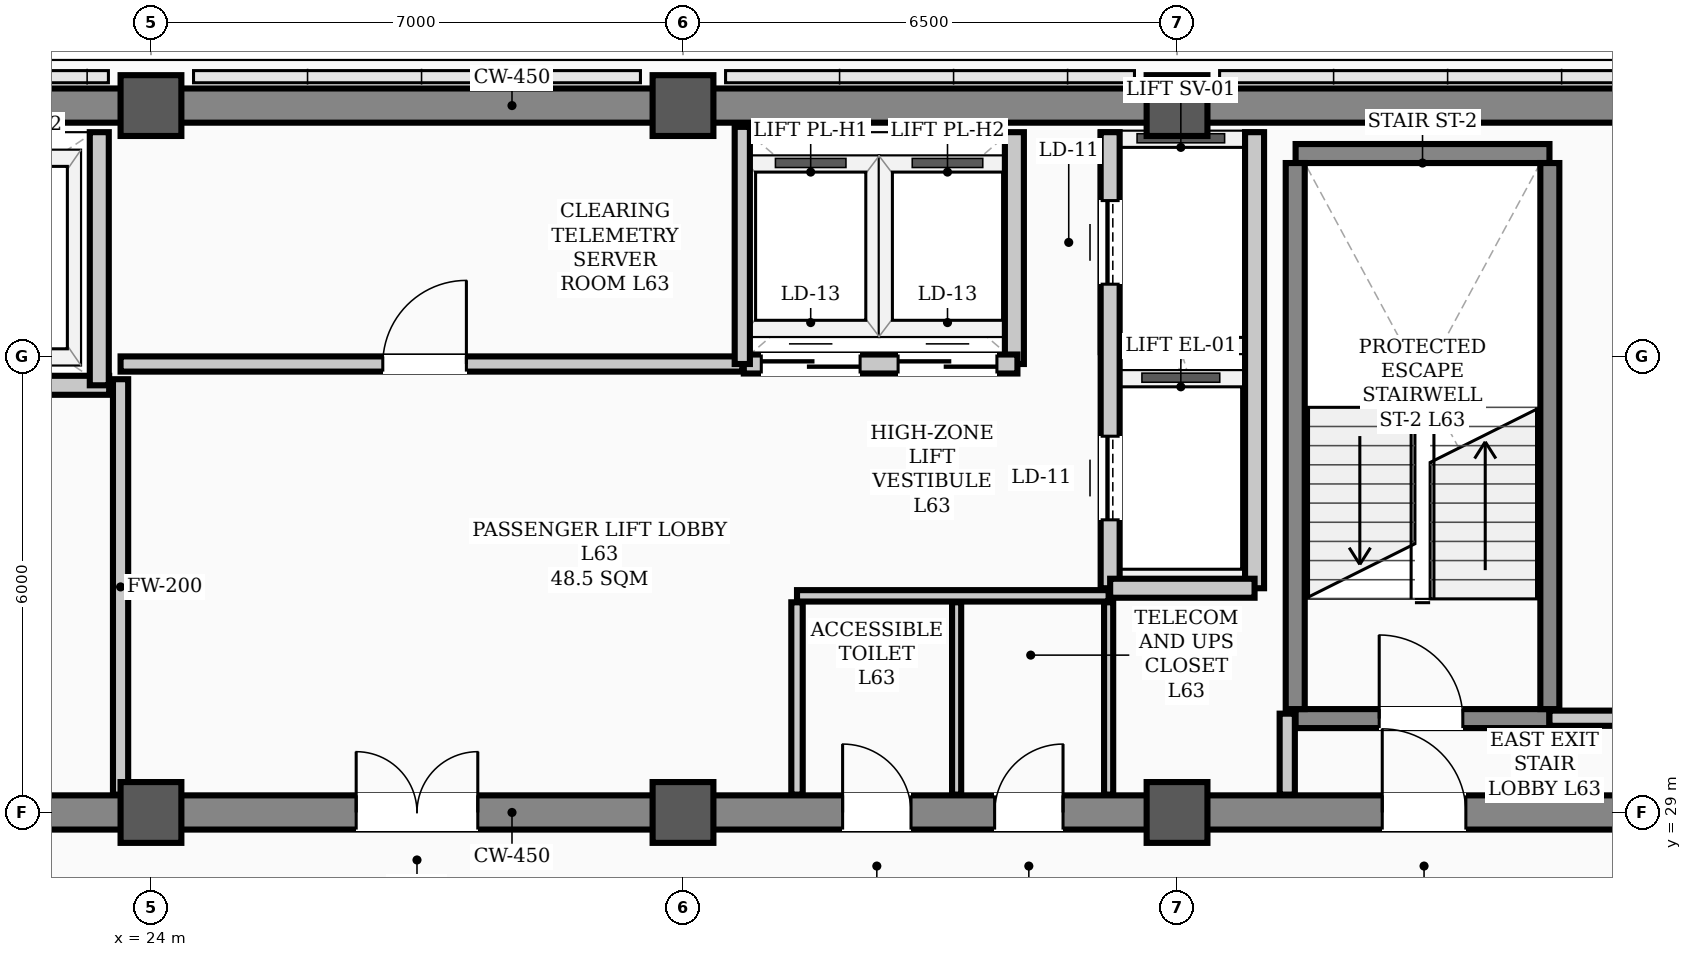
"""IFC4 building model, lengths in metres.
Left out: names, types, materials, properties, quantities, classifications, styles, units other than length and angle.
Written with IfcOpenShell. Run it as: python <this file> out.ifc"""

import sys

from ifc_helpers import new_model, si_unit, direction, frame, frame_2d, origin, origin_2d, place, context, subcontext, project, spatial, rectangle, hollow_rectangle, extrude, element, fill, save


model = new_model("IFC4")
c1 = context("Model", 3, precision=1e-05, world=origin(), true_north=direction((0.0, 1.0)))
c2 = subcontext(c1, "Body", "Model", "MODEL_VIEW")
j1 = project(units=[si_unit("LENGTHUNIT", "METRE"), si_unit("PLANEANGLEUNIT", "RADIAN")], contexts=[c1])
p1 = place(None, origin())
s1 = spatial("IfcSite", under=j1, at=p1, CompositionType="ELEMENT")
p2 = place(p1, origin())
s2 = spatial("IfcBuilding", under=s1, at=p2, CompositionType="ELEMENT")
p3 = place(p2, frame((0.0, 0.0, 254.0)))
s3 = spatial("IfcBuildingStorey", under=s2, at=p3, CompositionType="ELEMENT", Elevation=254.0)
for number, where, z_axis, x_axis in (
    (1, (24.0, 29.0, 0.0), (0.0, 0.0, 1.0), (1.0, 0.0, 0.0)),
    (2, (24.0, 38.3, 0.0), (0.0, 0.0, 1.0), (1.0, 0.0, 0.0)),
    (3, (31.0, 29.0, 0.0), (0.0, 0.0, 1.0), (1.0, 0.0, 0.0)),
    (4, (31.0, 38.3, 0.0), (0.0, 0.0, 1.0), (1.0, 0.0, 0.0)),
    (5, (37.5, 29.0, 0.0), (0.0, 0.0, 1.0), (1.0, 0.0, 0.0)),
    (6, (37.5, 38.3, 0.0), (0.0, 0.0, 1.0), (1.0, 0.0, 0.0)),
):
    element("IfcColumn", number, at=place(p3, frame(where, z_axis=z_axis, x_axis=x_axis)), inside=s3, PredefinedType="COLUMN", context=c2, shape_type="SweptSolid", body=[
        extrude(hollow_rectangle(XDim=0.8, YDim=0.8, WallThickness=0.032, InnerFilletRadius=0.016, OuterFilletRadius=0.048, at=origin_2d()), origin(), (0.0, 0.0, 1.0), 3.9),
    ])
p4 = place(p3, frame((13.5, 29.0, 0.0), z_axis=(0.0, 0.0, 1.0), x_axis=(1.0, 0.0, 0.0)))
e7 = element("IfcWall", 7, at=p4, inside=s3, PredefinedType="SHEAR", context=c2, shape_type="SweptSolid", body=[
    extrude(rectangle(XDim=30.5, YDim=0.45, at=frame_2d((15.25, 0.0))), origin(), (0.0, 0.0, 1.0), 3.66),
])
p5 = place(p4, frame((1.75, 0.0, 0.0)))
e8 = element("IfcOpeningElement", 8, at=p5, cuts=e7, PredefinedType="OPENING", context=c2, shape_type="SweptSolid", body=[
    extrude(rectangle(XDim=1.1, YDim=2.08, at=frame_2d((0.55, 1.04))), frame((0.0, 0.235, 0.0), z_axis=(0.0, -1.0, 0.0), x_axis=(1.0, 0.0, 0.0)), (0.0, 0.0, 1.0), 0.47),
])
p6 = place(p4, frame((26.7, 0.0, 0.0)))
e9 = element("IfcOpeningElement", 9, at=p6, cuts=e7, PredefinedType="OPENING", context=c2, shape_type="SweptSolid", body=[
    extrude(rectangle(XDim=1.1, YDim=2.08, at=frame_2d((0.55, 1.04))), frame((0.0, 0.235, 0.0), z_axis=(0.0, -1.0, 0.0), x_axis=(1.0, 0.0, 0.0)), (0.0, 0.0, 1.0), 0.47),
])
p7 = place(p4, frame((6.8, 0.0, 0.0)))
e10 = element("IfcOpeningElement", 10, at=p7, cuts=e7, PredefinedType="OPENING", context=c2, shape_type="SweptSolid", body=[
    extrude(rectangle(XDim=1.1, YDim=2.08, at=frame_2d((0.55, 1.04))), frame((0.0, 0.235, 0.0), z_axis=(0.0, -1.0, 0.0), x_axis=(1.0, 0.0, 0.0)), (0.0, 0.0, 1.0), 0.47),
])
p8 = place(p4, frame((13.2, 0.0, 0.0)))
e11 = element("IfcOpeningElement", 11, at=p8, cuts=e7, PredefinedType="OPENING", context=c2, shape_type="SweptSolid", body=[
    extrude(rectangle(XDim=1.6, YDim=2.08, at=frame_2d((0.8, 1.04))), frame((0.0, 0.235, 0.0), z_axis=(0.0, -1.0, 0.0), x_axis=(1.0, 0.0, 0.0)), (0.0, 0.0, 1.0), 0.47),
])
p9 = place(p4, frame((19.6, 0.0, 0.0)))
e12 = element("IfcOpeningElement", 12, at=p9, cuts=e7, PredefinedType="OPENING", context=c2, shape_type="SweptSolid", body=[
    extrude(rectangle(XDim=0.9, YDim=2.08, at=frame_2d((0.45, 1.04))), frame((0.0, 0.235, 0.0), z_axis=(0.0, -1.0, 0.0), x_axis=(1.0, 0.0, 0.0)), (0.0, 0.0, 1.0), 0.47),
])
p10 = place(p4, frame((21.6, 0.0, 0.0)))
e13 = element("IfcOpeningElement", 13, at=p10, cuts=e7, PredefinedType="OPENING", context=c2, shape_type="SweptSolid", body=[
    extrude(rectangle(XDim=0.9, YDim=2.08, at=frame_2d((0.45, 1.04))), frame((0.0, 0.235, 0.0), z_axis=(0.0, -1.0, 0.0), x_axis=(1.0, 0.0, 0.0)), (0.0, 0.0, 1.0), 0.47),
])
p11 = place(p3, frame((13.5, 38.3, 0.0), z_axis=(0.0, 0.0, 1.0), x_axis=(1.0, 0.0, 0.0)))
e14 = element("IfcWall", 14, at=p11, inside=s3, PredefinedType="SHEAR", context=c2, shape_type="SweptSolid", body=[
    extrude(rectangle(XDim=30.5, YDim=0.45, at=frame_2d((15.25, 0.0))), origin(), (0.0, 0.0, 1.0), 3.66),
])
p12 = place(p3, frame((39.06, 30.235, 0.0), z_axis=(0.0, 0.0, 1.0), x_axis=(1.0, 0.0, 0.0)))
e15 = element("IfcWall", 15, at=p12, inside=s3, PredefinedType="STANDARD", context=c2, shape_type="SweptSolid", body=[
    extrude(rectangle(XDim=3.34, YDim=0.25, at=frame_2d((1.67, 0.0))), origin(), (0.0, 0.0, 1.0), 3.66),
])
p13 = place(p12, frame((1.1, 0.0, 0.0)))
e16 = element("IfcOpeningElement", 16, at=p13, cuts=e15, PredefinedType="OPENING", context=c2, shape_type="SweptSolid", body=[
    extrude(rectangle(XDim=1.1, YDim=2.08, at=frame_2d((0.55, 1.04))), frame((0.0, 0.135, 0.0), z_axis=(0.0, -1.0, 0.0), x_axis=(1.0, 0.0, 0.0)), (0.0, 0.0, 1.0), 0.27),
])
p14 = place(p3, frame((39.06, 37.669, 0.0), z_axis=(0.0, 0.0, 1.0), x_axis=(1.0, 0.0, 0.0)))
e17 = element("IfcWall", 17, at=p14, inside=s3, PredefinedType="STANDARD", context=c2, shape_type="SweptSolid", body=[
    extrude(rectangle(XDim=3.34, YDim=0.25, at=frame_2d((1.67, 0.0))), origin(), (0.0, 0.0, 1.0), 3.66),
])
for number, where, z_axis, x_axis in (
    (18, (39.055, 30.36, 0.0), (0.0, 0.0, 1.0), (0.0, 1.0, 0.0)),
    (19, (42.405, 30.36, 0.0), (0.0, 0.0, 1.0), (0.0, 1.0, 0.0)),
):
    element("IfcWall", number, at=place(p3, frame(where, z_axis=z_axis, x_axis=x_axis)), inside=s3, PredefinedType="STANDARD", context=c2, shape_type="SweptSolid", body=[
        extrude(rectangle(XDim=7.184, YDim=0.25, at=frame_2d((3.592, 0.0))), origin(), (0.0, 0.0, 1.0), 3.66),
    ])
p15 = place(p3, frame((18.1, 34.62, 0.0), z_axis=(0.0, 0.0, 1.0), x_axis=(1.0, 0.0, 0.0)))
e20 = element("IfcWall", 20, at=p15, inside=s3, PredefinedType="STANDARD", context=c2, shape_type="SweptSolid", body=[
    extrude(rectangle(XDim=5.35, YDim=0.25, at=frame_2d((2.675, 0.0))), origin(), (0.0, 0.0, 1.0), 3.66),
])
p16 = place(p15, frame((0.85, 0.0, 0.0)))
e21 = element("IfcOpeningElement", 21, at=p16, cuts=e20, PredefinedType="OPENING", context=c2, shape_type="SweptSolid", body=[
    extrude(rectangle(XDim=1.1, YDim=2.08, at=frame_2d((0.55, 1.04))), frame((0.0, 0.135, 0.0), z_axis=(0.0, -1.0, 0.0), x_axis=(1.0, 0.0, 0.0)), (0.0, 0.0, 1.0), 0.27),
])
p17 = place(p15, frame((3.45, 0.0, 0.0)))
e22 = element("IfcOpeningElement", 22, at=p17, cuts=e20, PredefinedType="OPENING", context=c2, shape_type="SweptSolid", body=[
    extrude(rectangle(XDim=1.1, YDim=2.08, at=frame_2d((0.55, 1.04))), frame((0.0, 0.135, 0.0), z_axis=(0.0, -1.0, 0.0), x_axis=(1.0, 0.0, 0.0)), (0.0, 0.0, 1.0), 0.27),
])
p18 = place(p3, frame((36.62, 31.95, 0.0), z_axis=(0.0, 0.0, 1.0), x_axis=(0.0, 1.0, 0.0)))
e23 = element("IfcWall", 23, at=p18, inside=s3, PredefinedType="STANDARD", context=c2, shape_type="SweptSolid", body=[
    extrude(rectangle(XDim=6.0, YDim=0.25, at=frame_2d((3.0, 0.0))), origin(), (0.0, 0.0, 1.0), 2.24),
])
p19 = place(p18, frame((0.9, 0.0, 0.0)))
e24 = element("IfcOpeningElement", 24, at=p19, cuts=e23, PredefinedType="OPENING", context=c2, shape_type="SweptSolid", body=[
    extrude(rectangle(XDim=1.1, YDim=2.08, at=frame_2d((0.55, 1.04))), frame((0.0, 0.135, 0.0), z_axis=(0.0, -1.0, 0.0), x_axis=(1.0, 0.0, 0.0)), (0.0, 0.0, 1.0), 0.27),
])
p20 = place(p18, frame((4.0, 0.0, 0.0)))
e25 = element("IfcOpeningElement", 25, at=p20, cuts=e23, PredefinedType="OPENING", context=c2, shape_type="SweptSolid", body=[
    extrude(rectangle(XDim=1.1, YDim=2.08, at=frame_2d((0.55, 1.04))), frame((0.0, 0.135, 0.0), z_axis=(0.0, -1.0, 0.0), x_axis=(1.0, 0.0, 0.0)), (0.0, 0.0, 1.0), 0.27),
])
p21 = place(p3, frame((38.52, 31.95, 0.0), z_axis=(0.0, 0.0, 1.0), x_axis=(0.0, 1.0, 0.0)))
e26 = element("IfcWall", 26, at=p21, inside=s3, PredefinedType="STANDARD", context=c2, shape_type="SweptSolid", body=[
    extrude(rectangle(XDim=6.0, YDim=0.25, at=frame_2d((3.0, 0.0))), origin(), (0.0, 0.0, 1.0), 3.48),
])
p22 = place(p3, frame((36.62, 31.95, 0.0), z_axis=(0.0, 0.0, 1.0), x_axis=(1.0, 0.0, 0.0)))
e27 = element("IfcWall", 27, at=p22, inside=s3, PredefinedType="STANDARD", context=c2, shape_type="SweptSolid", body=[
    extrude(rectangle(XDim=1.9, YDim=0.25, at=frame_2d((0.95, 0.0))), origin(), (0.0, 0.0, 1.0), 3.48),
])
p23 = place(p3, frame((23.32, 34.62, 0.0), z_axis=(0.0, 0.0, 1.0), x_axis=(0.0, 1.0, 0.0)))
e28 = element("IfcWall", 28, at=p23, inside=s3, PredefinedType="STANDARD", context=c2, shape_type="SweptSolid", body=[
    extrude(rectangle(XDim=3.33, YDim=0.25, at=frame_2d((1.665, 0.0))), origin(), (0.0, 0.0, 1.0), 2.24),
])
p24 = place(p3, frame((35.36, 34.9, 0.0), z_axis=(0.0, 0.0, 1.0), x_axis=(0.0, 1.0, 0.0)))
e29 = element("IfcWall", 29, at=p24, inside=s3, PredefinedType="STANDARD", context=c2, shape_type="SweptSolid", body=[
    extrude(rectangle(XDim=3.05, YDim=0.25, at=frame_2d((1.525, 0.0))), origin(), (0.0, 0.0, 1.0), 2.24),
])
p25 = place(p3, frame((31.8, 34.9, 0.0), z_axis=(0.0, 0.0, 1.0), x_axis=(1.0, 0.0, 0.0)))
e30 = element("IfcWall", 30, at=p25, inside=s3, PredefinedType="STANDARD", context=c2, shape_type="SweptSolid", body=[
    extrude(rectangle(XDim=3.6, YDim=0.25, at=frame_2d((1.8, 0.0))), origin(), (0.0, 0.0, 1.0), 3.66),
])
p26 = place(p25, frame((0.23, 0.0, 0.0)))
e31 = element("IfcOpeningElement", 31, at=p26, cuts=e30, PredefinedType="OPENING", context=c2, shape_type="SweptSolid", body=[
    extrude(rectangle(XDim=1.3, YDim=2.08, at=frame_2d((0.65, 1.04))), frame((0.0, 0.135, 0.0), z_axis=(0.0, -1.0, 0.0), x_axis=(1.0, 0.0, 0.0)), (0.0, 0.0, 1.0), 0.27),
])
p27 = place(p25, frame((2.03, 0.0, 0.0)))
e32 = element("IfcOpeningElement", 32, at=p27, cuts=e30, PredefinedType="OPENING", context=c2, shape_type="SweptSolid", body=[
    extrude(rectangle(XDim=1.3, YDim=2.08, at=frame_2d((0.65, 1.04))), frame((0.0, 0.135, 0.0), z_axis=(0.0, -1.0, 0.0), x_axis=(1.0, 0.0, 0.0)), (0.0, 0.0, 1.0), 0.27),
])
p28 = place(p3, frame((42.4, 30.24, 0.0), z_axis=(0.0, 0.0, 1.0), x_axis=(1.0, 0.0, 0.0)))
e33 = element("IfcWall", 33, at=p28, inside=s3, PredefinedType="STANDARD", context=c2, shape_type="SweptSolid", body=[
    extrude(rectangle(XDim=1.365, YDim=0.2, at=frame_2d((0.683, 0.0))), origin(), (0.0, 0.0, 1.0), 3.66),
])
p29 = place(p3, frame((23.6, 34.9, 0.0), z_axis=(0.0, 0.0, 1.0), x_axis=(1.0, 0.0, 0.0)))
e34 = element("IfcWall", 34, at=p29, inside=s3, PredefinedType="STANDARD", context=c2, shape_type="SweptSolid", body=[
    extrude(rectangle(XDim=8.18, YDim=0.2, at=frame_2d((4.09, 0.0))), origin(), (0.0, 0.0, 1.0), 3.66),
])
p30 = place(p29, frame((3.45, 0.0, 0.0)))
e35 = element("IfcOpeningElement", 35, at=p30, cuts=e34, PredefinedType="OPENING", context=c2, shape_type="SweptSolid", body=[
    extrude(rectangle(XDim=1.1, YDim=2.08, at=frame_2d((0.55, 1.04))), frame((0.0, 0.11, 0.0), z_axis=(0.0, -1.0, 0.0), x_axis=(1.0, 0.0, 0.0)), (0.0, 0.0, 1.0), 0.22),
])
p31 = place(p3, frame((32.5, 31.85, 0.0), z_axis=(0.0, 0.0, 1.0), x_axis=(1.0, 0.0, 0.0)))
e36 = element("IfcWall", 36, at=p31, inside=s3, PredefinedType="PARTITIONING", context=c2, shape_type="SweptSolid", body=[
    extrude(rectangle(XDim=4.1, YDim=0.15, at=frame_2d((2.05, 0.0))), origin(), (0.0, 0.0, 1.0), 3.66),
])
p32 = place(p3, frame((38.95, 29.235, 0.0), z_axis=(0.0, 0.0, 1.0), x_axis=(0.0, 1.0, 0.0)))
e37 = element("IfcWall", 37, at=p32, inside=s3, PredefinedType="STANDARD", context=c2, shape_type="SweptSolid", body=[
    extrude(rectangle(XDim=1.065, YDim=0.2, at=frame_2d((0.532, 0.0))), origin(), (0.0, 0.0, 1.0), 3.66),
])
p33 = place(p3, frame((23.6, 29.235, 0.0), z_axis=(0.0, 0.0, 1.0), x_axis=(0.0, 1.0, 0.0)))
e38 = element("IfcWall", 38, at=p33, inside=s3, PredefinedType="STANDARD", context=c2, shape_type="SweptSolid", body=[
    extrude(rectangle(XDim=5.465, YDim=0.2, at=frame_2d((2.732, 0.0))), origin(), (0.0, 0.0, 1.0), 2.24),
])
p34 = place(p3, frame((32.5, 29.235, 0.0), z_axis=(0.0, 0.0, 1.0), x_axis=(0.0, 1.0, 0.0)))
e39 = element("IfcWall", 39, at=p34, inside=s3, PredefinedType="PARTITIONING", context=c2, shape_type="SweptSolid", body=[
    extrude(rectangle(XDim=2.53, YDim=0.15, at=frame_2d((1.265, 0.0))), origin(), (0.0, 0.0, 1.0), 2.24),
])
for number, where, z_axis, x_axis in (
    (40, (36.6, 29.235, 0.0), (0.0, 0.0, 1.0), (0.0, 1.0, 0.0)),
    (41, (34.6, 29.235, 0.0), (0.0, 0.0, 1.0), (0.0, 1.0, 0.0)),
):
    element("IfcWall", number, at=place(p3, frame(where, z_axis=z_axis, x_axis=x_axis)), inside=s3, PredefinedType="PARTITIONING", context=c2, shape_type="SweptSolid", body=[
        extrude(rectangle(XDim=2.53, YDim=0.12, at=frame_2d((1.265, 0.0))), origin(), (0.0, 0.0, 1.0), 2.24),
    ])
p35 = place(p3, frame((31.78, 34.9, 0.0), z_axis=(0.0, 0.0, 1.0), x_axis=(0.0, 1.0, 0.0)))
e42 = element("IfcWall", 42, at=p35, inside=s3, PredefinedType="STANDARD", context=c2, shape_type="SweptSolid", body=[
    extrude(rectangle(XDim=3.12, YDim=0.2, at=frame_2d((1.56, 0.0))), origin(), (0.0, 0.0, 1.0), 2.24),
])
p36 = place(p13, origin())
e43 = element("IfcDoor", 43, at=p36, inside=s3, OperationType="SINGLE_SWING_LEFT", PredefinedType="DOOR", context=c2, shape_type="SweptSolid", body=[
    extrude(rectangle(XDim=1.1, YDim=2.08, at=frame_2d((0.55, 1.04))), frame((0.0, 0.025, 0.0), z_axis=(0.0, -1.0, 0.0), x_axis=(1.0, 0.0, 0.0)), (0.0, 0.0, 1.0), 0.05),
])
fill(e16, e43)
p37 = place(p6, origin())
e44 = element("IfcDoor", 44, at=p37, inside=s3, OperationType="SINGLE_SWING_LEFT", PredefinedType="DOOR", context=c2, shape_type="SweptSolid", body=[
    extrude(rectangle(XDim=1.1, YDim=2.08, at=frame_2d((0.55, 1.04))), frame((0.0, 0.025, 0.0), z_axis=(0.0, -1.0, 0.0), x_axis=(1.0, 0.0, 0.0)), (0.0, 0.0, 1.0), 0.05),
])
fill(e9, e44)
p38 = place(p8, origin())
e45 = element("IfcDoor", 45, at=p38, inside=s3, OperationType="DOUBLE_DOOR_SINGLE_SWING", PredefinedType="DOOR", context=c2, shape_type="SweptSolid", body=[
    extrude(rectangle(XDim=1.6, YDim=2.08, at=frame_2d((0.8, 1.04))), frame((0.0, 0.025, 0.0), z_axis=(0.0, -1.0, 0.0), x_axis=(1.0, 0.0, 0.0)), (0.0, 0.0, 1.0), 0.05),
])
fill(e11, e45)
p39 = place(p30, origin())
e46 = element("IfcDoor", 46, at=p39, inside=s3, OperationType="SINGLE_SWING_RIGHT", PredefinedType="DOOR", context=c2, shape_type="SweptSolid", body=[
    extrude(rectangle(XDim=1.1, YDim=2.08, at=frame_2d((0.55, 1.04))), frame((0.0, 0.025, 0.0), z_axis=(0.0, -1.0, 0.0), x_axis=(1.0, 0.0, 0.0)), (0.0, 0.0, 1.0), 0.05),
])
fill(e35, e46)
p40 = place(p9, origin())
e47 = element("IfcDoor", 47, at=p40, inside=s3, OperationType="SINGLE_SWING_LEFT", PredefinedType="DOOR", context=c2, shape_type="SweptSolid", body=[
    extrude(rectangle(XDim=0.9, YDim=2.08, at=frame_2d((0.45, 1.04))), frame((0.0, 0.025, 0.0), z_axis=(0.0, -1.0, 0.0), x_axis=(1.0, 0.0, 0.0)), (0.0, 0.0, 1.0), 0.05),
])
fill(e12, e47)
p41 = place(p10, origin())
e48 = element("IfcDoor", 48, at=p41, inside=s3, OperationType="SINGLE_SWING_RIGHT", PredefinedType="DOOR", context=c2, shape_type="SweptSolid", body=[
    extrude(rectangle(XDim=0.9, YDim=2.08, at=frame_2d((0.45, 1.04))), frame((0.0, 0.025, 0.0), z_axis=(0.0, -1.0, 0.0), x_axis=(1.0, 0.0, 0.0)), (0.0, 0.0, 1.0), 0.05),
])
fill(e13, e48)
p42 = place(p19, origin())
e49 = element("IfcDoor", 49, at=p42, inside=s3, OperationType="SLIDING_TO_LEFT", PredefinedType="DOOR", context=c2, shape_type="SweptSolid", body=[
    extrude(rectangle(XDim=1.1, YDim=2.08, at=frame_2d((0.55, 1.04))), frame((0.0, 0.025, 0.0), z_axis=(0.0, -1.0, 0.0), x_axis=(1.0, 0.0, 0.0)), (0.0, 0.0, 1.0), 0.05),
])
fill(e24, e49)
p43 = place(p20, origin())
e50 = element("IfcDoor", 50, at=p43, inside=s3, OperationType="SLIDING_TO_LEFT", PredefinedType="DOOR", context=c2, shape_type="SweptSolid", body=[
    extrude(rectangle(XDim=1.1, YDim=2.08, at=frame_2d((0.55, 1.04))), frame((0.0, 0.025, 0.0), z_axis=(0.0, -1.0, 0.0), x_axis=(1.0, 0.0, 0.0)), (0.0, 0.0, 1.0), 0.05),
])
fill(e25, e50)
p44 = place(p26, origin())
e51 = element("IfcDoor", 51, at=p44, inside=s3, OperationType="DOUBLE_DOOR_SLIDING", PredefinedType="DOOR", context=c2, shape_type="SweptSolid", body=[
    extrude(rectangle(XDim=1.3, YDim=2.08, at=frame_2d((0.65, 1.04))), frame((0.0, 0.025, 0.0), z_axis=(0.0, -1.0, 0.0), x_axis=(1.0, 0.0, 0.0)), (0.0, 0.0, 1.0), 0.05),
])
fill(e31, e51)
p45 = place(p27, origin())
e52 = element("IfcDoor", 52, at=p45, inside=s3, OperationType="DOUBLE_DOOR_SLIDING", PredefinedType="DOOR", context=c2, shape_type="SweptSolid", body=[
    extrude(rectangle(XDim=1.3, YDim=2.08, at=frame_2d((0.65, 1.04))), frame((0.0, 0.025, 0.0), z_axis=(0.0, -1.0, 0.0), x_axis=(1.0, 0.0, 0.0)), (0.0, 0.0, 1.0), 0.05),
])
fill(e32, e52)
save(model, sys.argv[1])
